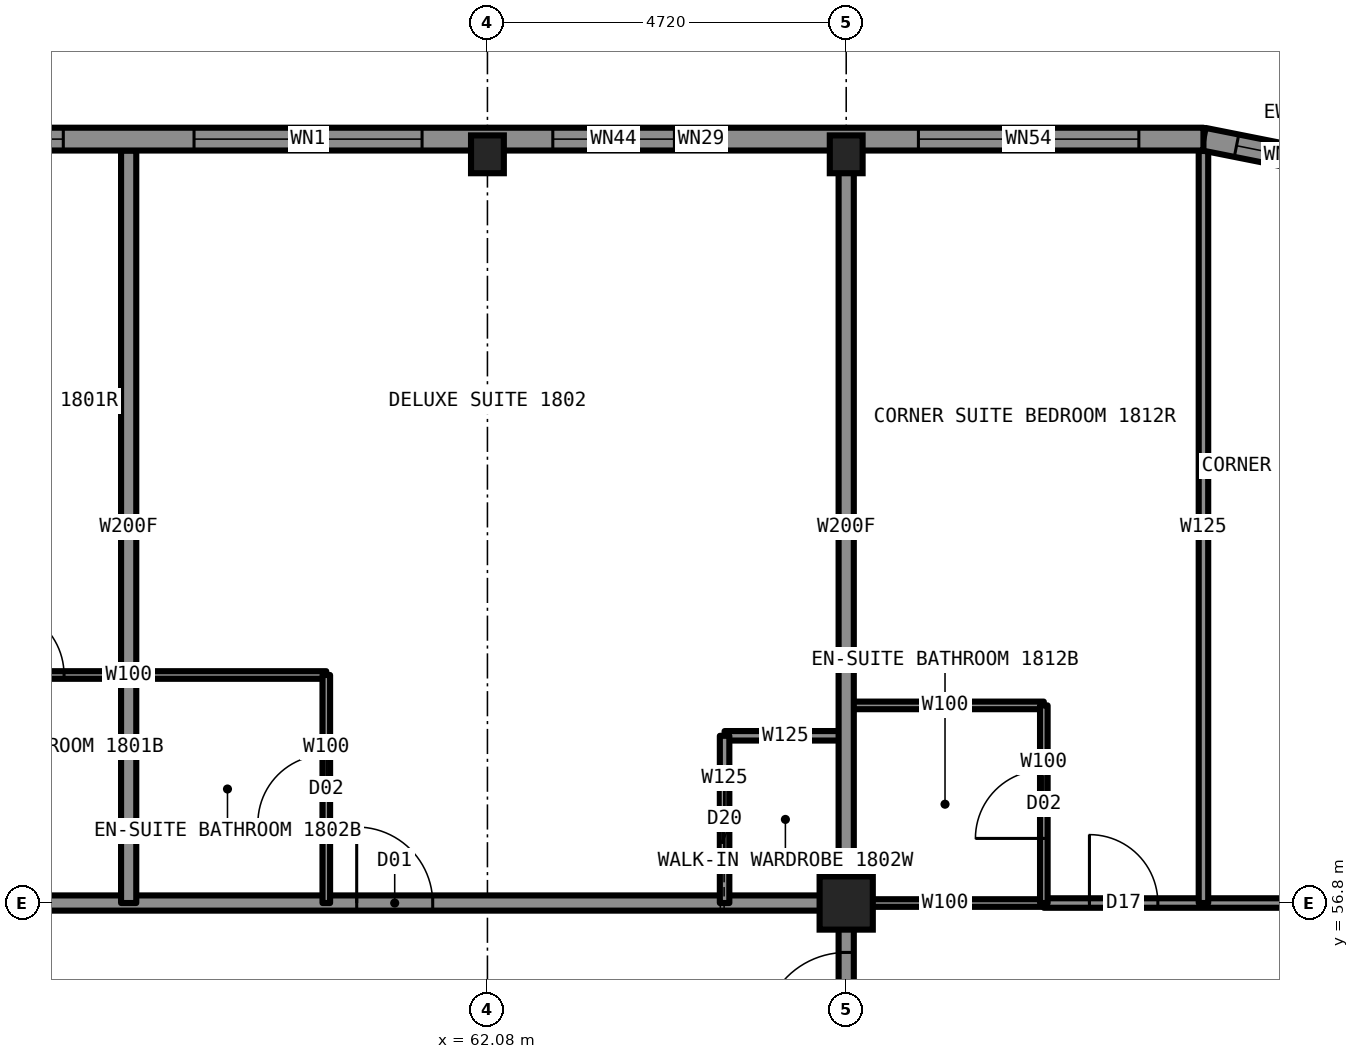
"""IFC4 building model, lengths in metres.
Left out: names, types, materials, properties, quantities, classifications, styles, units other than length and angle.
Written with IfcOpenShell. Run it as: python <this file> out.ifc"""

import sys

from ifc_helpers import new_model, si_unit, direction, frame, frame_2d, origin, origin_2d, place, context, subcontext, project, spatial, rectangle, hollow_rectangle, i_section, extrude, element, fill, save


model = new_model("IFC4")
c1 = context("Model", 3, precision=1e-05, world=origin(), true_north=direction((0.0, 1.0)))
c2 = subcontext(c1, "Body", "Model", "MODEL_VIEW")
j1 = project(units=[si_unit("LENGTHUNIT", "METRE"), si_unit("PLANEANGLEUNIT", "RADIAN")], contexts=[c1])
p1 = place(None, origin())
s1 = spatial("IfcSite", under=j1, at=p1, CompositionType="ELEMENT")
p2 = place(p1, origin())
s2 = spatial("IfcBuilding", under=s1, at=p2, CompositionType="ELEMENT")
p3 = place(p2, frame((0.0, 0.0, 70.5)))
s3 = spatial("IfcBuildingStorey", under=s2, at=p3, CompositionType="ELEMENT", Elevation=70.5)
for number, where, z_axis, x_axis in (
    (1, (62.08, 66.65, 0.0), (0.0, 0.0, 1.0), (1.0, 0.0, 0.0)),
    (2, (66.8, 66.65, 0.0), (0.0, 0.0, 1.0), (1.0, 0.0, 0.0)),
):
    element("IfcColumn", number, at=place(p3, frame(where, z_axis=z_axis, x_axis=x_axis)), inside=s3, PredefinedType="COLUMN", context=c2, shape_type="SweptSolid", body=[
        extrude(i_section(OverallWidth=0.432, OverallDepth=0.498, WebThickness=0.056, FlangeThickness=0.089, at=origin_2d()), origin(), (0.0, 0.0, 1.0), 3.5),
    ])
p4 = place(p3, frame((66.8, 56.8, 0.0), z_axis=(0.0, 0.0, 1.0), x_axis=(1.0, 0.0, 0.0)))
e3 = element("IfcColumn", 3, at=p4, inside=s3, PredefinedType="COLUMN", context=c2, shape_type="SweptSolid", body=[
    extrude(hollow_rectangle(XDim=0.7, YDim=0.7, WallThickness=0.06, at=origin_2d()), origin(), (0.0, 0.0, 1.0), 3.5),
])
p5 = place(p3, frame((66.8, 56.8, 0.0), z_axis=(0.0, 0.0, 1.0), x_axis=(1.0, 0.0, 0.0)))
e4 = element("IfcWall", 4, at=p5, inside=s3, PredefinedType="PARTITIONING", context=c2, shape_type="SweptSolid", body=[
    extrude(rectangle(XDim=2.6, YDim=0.1, at=frame_2d((1.3, 0.0))), origin(), (0.0, 0.0, 1.0), 2.573),
])
p6 = place(p3, frame((43.2, 56.8, 0.0), z_axis=(0.0, 0.0, 1.0), x_axis=(1.0, 0.0, 0.0)))
e5 = element("IfcWall", 5, at=p6, inside=s3, PredefinedType="PARTITIONING", context=c2, shape_type="SweptSolid", body=[
    extrude(rectangle(XDim=23.6, YDim=0.2, at=frame_2d((11.8, 0.0))), origin(), (0.0, 0.0, 1.0), 3.33),
])
p7 = place(p6, frame((1.85, 0.0, 0.0)))
e6 = element("IfcOpeningElement", 6, at=p7, cuts=e5, PredefinedType="OPENING", context=c2, shape_type="SweptSolid", body=[
    extrude(rectangle(XDim=1.1, YDim=2.2, at=frame_2d((0.55, 1.1))), frame((0.0, 0.11, 0.0), z_axis=(0.0, -1.0, 0.0), x_axis=(1.0, 0.0, 0.0)), (0.0, 0.0, 1.0), 0.22),
])
p8 = place(p6, frame((17.16, 0.0, 0.0)))
e7 = element("IfcOpeningElement", 7, at=p8, cuts=e5, PredefinedType="OPENING", context=c2, shape_type="SweptSolid", body=[
    extrude(rectangle(XDim=1.0, YDim=2.2, at=frame_2d((0.5, 1.1))), frame((0.0, 0.11, 0.0), z_axis=(0.0, -1.0, 0.0), x_axis=(1.0, 0.0, 0.0)), (0.0, 0.0, 1.0), 0.22),
])
p9 = place(p3, frame((69.4, 56.8, 0.0), z_axis=(0.0, 0.0, 1.0), x_axis=(1.0, 0.0, 0.0)))
e8 = element("IfcWall", 8, at=p9, inside=s3, PredefinedType="PARTITIONING", context=c2, shape_type="SweptSolid", body=[
    extrude(rectangle(XDim=7.3, YDim=0.125, at=frame_2d((3.65, 0.0))), origin(), (0.0, 0.0, 1.0), 2.573),
])
p10 = place(p9, frame((0.6, 0.0, 0.0)))
e9 = element("IfcOpeningElement", 9, at=p10, cuts=e8, PredefinedType="OPENING", context=c2, shape_type="SweptSolid", body=[
    extrude(rectangle(XDim=0.9, YDim=2.2, at=frame_2d((0.45, 1.1))), frame((0.0, 0.073, 0.0), z_axis=(0.0, -1.0, 0.0), x_axis=(1.0, 0.0, 0.0)), (0.0, 0.0, 1.0), 0.145),
])
p11 = place(p9, frame((4.4, 0.0, 0.0)))
e10 = element("IfcOpeningElement", 10, at=p11, cuts=e8, PredefinedType="OPENING", context=c2, shape_type="SweptSolid", body=[
    extrude(rectangle(XDim=0.9, YDim=2.2, at=frame_2d((0.45, 1.1))), frame((0.0, 0.073, 0.0), z_axis=(0.0, -1.0, 0.0), x_axis=(1.0, 0.0, 0.0)), (0.0, 0.0, 1.0), 0.145),
])
p12 = place(p3, frame((65.2, 59.0, 0.0), z_axis=(0.0, 0.0, 1.0), x_axis=(1.0, 0.0, 0.0)))
e11 = element("IfcWall", 11, at=p12, inside=s3, PredefinedType="PARTITIONING", context=c2, shape_type="SweptSolid", body=[
    extrude(rectangle(XDim=1.6, YDim=0.125, at=frame_2d((0.8, 0.0))), origin(), (0.0, 0.0, 1.0), 3.33),
])
p13 = place(p3, frame((66.8, 59.4, 0.0), z_axis=(0.0, 0.0, 1.0), x_axis=(1.0, 0.0, 0.0)))
e12 = element("IfcWall", 12, at=p13, inside=s3, PredefinedType="PARTITIONING", context=c2, shape_type="SweptSolid", body=[
    extrude(rectangle(XDim=2.6, YDim=0.1, at=frame_2d((1.3, 0.0))), origin(), (0.0, 0.0, 1.0), 3.33),
])
p14 = place(p3, frame((54.76, 59.8, 0.0), z_axis=(0.0, 0.0, 1.0), x_axis=(1.0, 0.0, 0.0)))
e13 = element("IfcWall", 13, at=p14, inside=s3, PredefinedType="PARTITIONING", context=c2, shape_type="SweptSolid", body=[
    extrude(rectangle(XDim=5.2, YDim=0.1, at=frame_2d((2.6, 0.0))), origin(), (0.0, 0.0, 1.0), 3.33),
])
p15 = place(p14, frame((0.85, 0.0, 0.0)))
e14 = element("IfcOpeningElement", 14, at=p15, cuts=e13, PredefinedType="OPENING", context=c2, shape_type="SweptSolid", body=[
    extrude(rectangle(XDim=0.9, YDim=2.1, at=frame_2d((0.45, 1.05))), frame((0.0, 0.06, 0.0), z_axis=(0.0, -1.0, 0.0), x_axis=(1.0, 0.0, 0.0)), (0.0, 0.0, 1.0), 0.12),
])
p16 = place(p3, frame((65.2, 56.8, 0.0), z_axis=(0.0, 0.0, 1.0), x_axis=(0.0, 1.0, 0.0)))
e15 = element("IfcWall", 15, at=p16, inside=s3, PredefinedType="PARTITIONING", context=c2, shape_type="SweptSolid", body=[
    extrude(rectangle(XDim=2.2, YDim=0.125, at=frame_2d((1.1, 0.0))), origin(), (0.0, 0.0, 1.0), 3.33),
])
p17 = place(p16, frame((0.7, 0.0, 0.0)))
e16 = element("IfcOpeningElement", 16, at=p17, cuts=e15, PredefinedType="OPENING", context=c2, shape_type="SweptSolid", body=[
    extrude(rectangle(XDim=0.8, YDim=2.1, at=frame_2d((0.4, 1.05))), frame((0.0, 0.073, 0.0), z_axis=(0.0, -1.0, 0.0), x_axis=(1.0, 0.0, 0.0)), (0.0, 0.0, 1.0), 0.145),
])
p18 = place(p3, frame((66.8, 33.2, 0.0), z_axis=(0.0, 0.0, 1.0), x_axis=(0.0, 1.0, 0.0)))
e17 = element("IfcWall", 17, at=p18, inside=s3, PredefinedType="PARTITIONING", context=c2, shape_type="SweptSolid", body=[
    extrude(rectangle(XDim=23.6, YDim=0.2, at=frame_2d((11.8, 0.0))), origin(), (0.0, 0.0, 1.0), 3.33),
])
p19 = place(p18, frame((6.98, 0.0, 0.0)))
e18 = element("IfcOpeningElement", 18, at=p19, cuts=e17, PredefinedType="OPENING", context=c2, shape_type="SweptSolid", body=[
    extrude(rectangle(XDim=1.0, YDim=2.2, at=frame_2d((0.5, 1.1))), frame((0.0, 0.11, 0.0), z_axis=(0.0, -1.0, 0.0), x_axis=(1.0, 0.0, 0.0)), (0.0, 0.0, 1.0), 0.22),
])
p20 = place(p18, frame((12.44, 0.0, 0.0)))
e19 = element("IfcOpeningElement", 19, at=p20, cuts=e17, PredefinedType="OPENING", context=c2, shape_type="SweptSolid", body=[
    extrude(rectangle(XDim=1.0, YDim=2.2, at=frame_2d((0.5, 1.1))), frame((0.0, 0.11, 0.0), z_axis=(0.0, -1.0, 0.0), x_axis=(1.0, 0.0, 0.0)), (0.0, 0.0, 1.0), 0.22),
])
p21 = place(p18, frame((21.85, 0.0, 0.0)))
e20 = element("IfcOpeningElement", 20, at=p21, cuts=e17, PredefinedType="OPENING", context=c2, shape_type="SweptSolid", body=[
    extrude(rectangle(XDim=1.1, YDim=2.2, at=frame_2d((0.55, 1.1))), frame((0.0, 0.11, 0.0), z_axis=(0.0, -1.0, 0.0), x_axis=(1.0, 0.0, 0.0)), (0.0, 0.0, 1.0), 0.22),
])
p22 = place(p18, frame((0.66, 0.0, 0.0)))
e21 = element("IfcOpeningElement", 21, at=p22, cuts=e17, PredefinedType="OPENING", context=c2, shape_type="SweptSolid", body=[
    extrude(rectangle(XDim=1.1, YDim=2.2, at=frame_2d((0.55, 1.1))), frame((0.0, 0.11, 0.0), z_axis=(0.0, -1.0, 0.0), x_axis=(1.0, 0.0, 0.0)), (0.0, 0.0, 1.0), 0.22),
])
p23 = place(p3, frame((66.8, 56.8, 0.0), z_axis=(0.0, 0.0, 1.0), x_axis=(0.0, 1.0, 0.0)))
e22 = element("IfcWall", 22, at=p23, inside=s3, PredefinedType="PARTITIONING", context=c2, shape_type="SweptSolid", body=[
    extrude(rectangle(XDim=9.9, YDim=0.2, at=frame_2d((4.95, 0.0))), origin(), (0.0, 0.0, 1.0), 2.573),
])
p24 = place(p3, frame((69.4, 56.8, 0.0), z_axis=(0.0, 0.0, 1.0), x_axis=(0.0, 1.0, 0.0)))
e23 = element("IfcWall", 23, at=p24, inside=s3, PredefinedType="PARTITIONING", context=c2, shape_type="SweptSolid", body=[
    extrude(rectangle(XDim=2.6, YDim=0.1, at=frame_2d((1.3, 0.0))), origin(), (0.0, 0.0, 1.0), 3.33),
])
p25 = place(p24, frame((0.85, 0.0, 0.0)))
e24 = element("IfcOpeningElement", 24, at=p25, cuts=e23, PredefinedType="OPENING", context=c2, shape_type="SweptSolid", body=[
    extrude(rectangle(XDim=0.9, YDim=2.1, at=frame_2d((0.45, 1.05))), frame((0.0, 0.06, 0.0), z_axis=(0.0, -1.0, 0.0), x_axis=(1.0, 0.0, 0.0)), (0.0, 0.0, 1.0), 0.12),
])
p26 = place(p3, frame((71.5, 56.8, 0.0), z_axis=(0.0, 0.0, 1.0), x_axis=(0.0, 1.0, 0.0)))
e25 = element("IfcWall", 25, at=p26, inside=s3, PredefinedType="PARTITIONING", context=c2, shape_type="SweptSolid", body=[
    extrude(rectangle(XDim=9.894, YDim=0.125, at=frame_2d((4.947, 0.0))), origin(), (0.0, 0.0, 1.0), 3.33),
])
p27 = place(p3, frame((57.36, 56.8, 0.0), z_axis=(0.0, 0.0, 1.0), x_axis=(0.0, 1.0, 0.0)))
e26 = element("IfcWall", 26, at=p27, inside=s3, PredefinedType="PARTITIONING", context=c2, shape_type="SweptSolid", body=[
    extrude(rectangle(XDim=9.9, YDim=0.2, at=frame_2d((4.95, 0.0))), origin(), (0.0, 0.0, 1.0), 3.33),
])
p28 = place(p3, frame((59.96, 56.8, 0.0), z_axis=(0.0, 0.0, 1.0), x_axis=(0.0, 1.0, 0.0)))
e27 = element("IfcWall", 27, at=p28, inside=s3, PredefinedType="PARTITIONING", context=c2, shape_type="SweptSolid", body=[
    extrude(rectangle(XDim=3.0, YDim=0.1, at=frame_2d((1.5, 0.0))), origin(), (0.0, 0.0, 1.0), 3.33),
])
p29 = place(p28, frame((1.05, 0.0, 0.0)))
e28 = element("IfcOpeningElement", 28, at=p29, cuts=e27, PredefinedType="OPENING", context=c2, shape_type="SweptSolid", body=[
    extrude(rectangle(XDim=0.9, YDim=2.1, at=frame_2d((0.45, 1.05))), frame((0.0, 0.06, 0.0), z_axis=(0.0, -1.0, 0.0), x_axis=(1.0, 0.0, 0.0)), (0.0, 0.0, 1.0), 0.12),
])
p30 = place(p3, frame((73.547, 66.443, 0.0), z_axis=(0.0, 0.0, 1.0), x_axis=(-0.980787050784, 0.195081421501, 0.0)))
e29 = element("IfcWall", 29, at=p30, inside=s3, PredefinedType="SOLIDWALL", context=c2, shape_type="SweptSolid", body=[
    extrude(rectangle(XDim=2.087, YDim=0.3, at=frame_2d((1.044, 0.0))), origin(), (0.0, 0.0, 1.0), 3.33),
])
p31 = place(p30, frame((0.444, 0.0, 0.5)))
e30 = element("IfcOpeningElement", 30, at=p31, cuts=e29, PredefinedType="OPENING", context=c2, shape_type="SweptSolid", body=[
    extrude(rectangle(XDim=1.2, YDim=2.0, at=frame_2d((0.6, 1.0))), frame((0.0, 0.16, 0.0), z_axis=(0.0, -1.0, 0.0), x_axis=(1.0, 0.0, 0.0)), (0.0, 0.0, 1.0), 0.32),
])
p32 = place(p3, frame((71.5, 66.85, 0.0), z_axis=(0.0, 0.0, 1.0), x_axis=(-1.0, 0.0, 0.0)))
e31 = element("IfcWall", 31, at=p32, inside=s3, PredefinedType="SOLIDWALL", context=c2, shape_type="SweptSolid", body=[
    extrude(rectangle(XDim=33.0, YDim=0.3, at=frame_2d((16.5, 0.0))), origin(), (0.0, 0.0, 1.0), 2.83),
])
p33 = place(p32, frame((0.85, 0.0, 0.5)))
e32 = element("IfcOpeningElement", 32, at=p33, cuts=e31, PredefinedType="OPENING", context=c2, shape_type="SweptSolid", body=[
    extrude(rectangle(XDim=2.9, YDim=2.0, at=frame_2d((1.45, 1.0))), frame((0.0, 0.16, 0.0), z_axis=(0.0, -1.0, 0.0), x_axis=(1.0, 0.0, 0.0)), (0.0, 0.0, 1.0), 0.32),
])
p34 = place(p32, frame((6.96, 0.0, 0.55)))
e33 = element("IfcOpeningElement", 33, at=p34, cuts=e31, PredefinedType="OPENING", context=c2, shape_type="SweptSolid", body=[
    extrude(rectangle(XDim=1.6, YDim=1.9, at=frame_2d((0.8, 0.95))), frame((0.0, 0.16, 0.0), z_axis=(0.0, -1.0, 0.0), x_axis=(1.0, 0.0, 0.0)), (0.0, 0.0, 1.0), 0.32),
])
p35 = place(p32, frame((10.28, 0.0, 0.5)))
e34 = element("IfcOpeningElement", 34, at=p35, cuts=e31, PredefinedType="OPENING", context=c2, shape_type="SweptSolid", body=[
    extrude(rectangle(XDim=3.0, YDim=2.0, at=frame_2d((1.5, 1.0))), frame((0.0, 0.16, 0.0), z_axis=(0.0, -1.0, 0.0), x_axis=(1.0, 0.0, 0.0)), (0.0, 0.0, 1.0), 0.32),
])
p36 = place(p32, frame((15.0, 0.0, 0.5)))
e35 = element("IfcOpeningElement", 35, at=p36, cuts=e31, PredefinedType="OPENING", context=c2, shape_type="SweptSolid", body=[
    extrude(rectangle(XDim=3.0, YDim=2.0, at=frame_2d((1.5, 1.0))), frame((0.0, 0.16, 0.0), z_axis=(0.0, -1.0, 0.0), x_axis=(1.0, 0.0, 0.0)), (0.0, 0.0, 1.0), 0.32),
])
p37 = place(p32, frame((19.72, 0.0, 0.5)))
e36 = element("IfcOpeningElement", 36, at=p37, cuts=e31, PredefinedType="OPENING", context=c2, shape_type="SweptSolid", body=[
    extrude(rectangle(XDim=3.0, YDim=2.0, at=frame_2d((1.5, 1.0))), frame((0.0, 0.16, 0.0), z_axis=(0.0, -1.0, 0.0), x_axis=(1.0, 0.0, 0.0)), (0.0, 0.0, 1.0), 0.32),
])
p38 = place(p32, frame((24.44, 0.0, 0.55)))
e37 = element("IfcOpeningElement", 37, at=p38, cuts=e31, PredefinedType="OPENING", context=c2, shape_type="SweptSolid", body=[
    extrude(rectangle(XDim=1.6, YDim=1.9, at=frame_2d((0.8, 0.95))), frame((0.0, 0.16, 0.0), z_axis=(0.0, -1.0, 0.0), x_axis=(1.0, 0.0, 0.0)), (0.0, 0.0, 1.0), 0.32),
])
p39 = place(p32, frame((29.25, 0.0, 0.5)))
e38 = element("IfcOpeningElement", 38, at=p39, cuts=e31, PredefinedType="OPENING", context=c2, shape_type="SweptSolid", body=[
    extrude(rectangle(XDim=2.9, YDim=2.0, at=frame_2d((1.45, 1.0))), frame((0.0, 0.16, 0.0), z_axis=(0.0, -1.0, 0.0), x_axis=(1.0, 0.0, 0.0)), (0.0, 0.0, 1.0), 0.32),
])
p40 = place(p32, frame((6.31, 0.0, 1.45)))
e39 = element("IfcOpeningElement", 39, at=p40, cuts=e31, PredefinedType="OPENING", context=c2, shape_type="SweptSolid", body=[
    extrude(rectangle(XDim=0.6, YDim=1.0, at=frame_2d((0.3, 0.5))), frame((0.0, 0.16, 0.0), z_axis=(0.0, -1.0, 0.0), x_axis=(1.0, 0.0, 0.0)), (0.0, 0.0, 1.0), 0.32),
])
p41 = place(p32, frame((26.04, 0.0, 1.45)))
e40 = element("IfcOpeningElement", 40, at=p41, cuts=e31, PredefinedType="OPENING", context=c2, shape_type="SweptSolid", body=[
    extrude(rectangle(XDim=0.6, YDim=1.0, at=frame_2d((0.3, 0.5))), frame((0.0, 0.16, 0.0), z_axis=(0.0, -1.0, 0.0), x_axis=(1.0, 0.0, 0.0)), (0.0, 0.0, 1.0), 0.32),
])
p42 = place(p15, origin())
e41 = element("IfcDoor", 41, at=p42, inside=s3, OperationType="SINGLE_SWING_RIGHT", PredefinedType="DOOR", context=c2, shape_type="SweptSolid", body=[
    extrude(rectangle(XDim=0.9, YDim=2.1, at=frame_2d((0.45, 1.05))), frame((0.0, 0.025, 0.0), z_axis=(0.0, -1.0, 0.0), x_axis=(1.0, 0.0, 0.0)), (0.0, 0.0, 1.0), 0.05),
])
fill(e14, e41)
p43 = place(p8, origin())
e42 = element("IfcDoor", 42, at=p43, inside=s3, OperationType="SINGLE_SWING_LEFT", PredefinedType="DOOR", context=c2, shape_type="SweptSolid", body=[
    extrude(rectangle(XDim=1.0, YDim=2.2, at=frame_2d((0.5, 1.1))), frame((0.0, 0.025, 0.0), z_axis=(0.0, -1.0, 0.0), x_axis=(1.0, 0.0, 0.0)), (0.0, 0.0, 1.0), 0.05),
])
fill(e7, e42)
p44 = place(p29, origin())
e43 = element("IfcDoor", 43, at=p44, inside=s3, OperationType="SINGLE_SWING_RIGHT", PredefinedType="DOOR", context=c2, shape_type="SweptSolid", body=[
    extrude(rectangle(XDim=0.9, YDim=2.1, at=frame_2d((0.45, 1.05))), frame((0.0, 0.025, 0.0), z_axis=(0.0, -1.0, 0.0), x_axis=(1.0, 0.0, 0.0)), (0.0, 0.0, 1.0), 0.05),
])
fill(e28, e43)
p45 = place(p17, origin())
e44 = element("IfcDoor", 44, at=p45, inside=s3, OperationType="SLIDING_TO_LEFT", PredefinedType="DOOR", context=c2, shape_type="SweptSolid", body=[
    extrude(rectangle(XDim=0.8, YDim=2.1, at=frame_2d((0.4, 1.05))), frame((0.0, 0.025, 0.0), z_axis=(0.0, -1.0, 0.0), x_axis=(1.0, 0.0, 0.0)), (0.0, 0.0, 1.0), 0.05),
])
fill(e16, e44)
p46 = place(p21, origin())
e45 = element("IfcDoor", 45, at=p46, inside=s3, OperationType="SINGLE_SWING_LEFT", PredefinedType="DOOR", context=c2, shape_type="SweptSolid", body=[
    extrude(rectangle(XDim=1.1, YDim=2.2, at=frame_2d((0.55, 1.1))), frame((0.0, 0.025, 0.0), z_axis=(0.0, -1.0, 0.0), x_axis=(1.0, 0.0, 0.0)), (0.0, 0.0, 1.0), 0.05),
])
fill(e20, e45)
p47 = place(p25, origin())
e46 = element("IfcDoor", 46, at=p47, inside=s3, OperationType="SINGLE_SWING_RIGHT", PredefinedType="DOOR", context=c2, shape_type="SweptSolid", body=[
    extrude(rectangle(XDim=0.9, YDim=2.1, at=frame_2d((0.45, 1.05))), frame((0.0, 0.025, 0.0), z_axis=(0.0, -1.0, 0.0), x_axis=(1.0, 0.0, 0.0)), (0.0, 0.0, 1.0), 0.05),
])
fill(e24, e46)
p48 = place(p10, origin())
e47 = element("IfcDoor", 47, at=p48, inside=s3, OperationType="SINGLE_SWING_LEFT", PredefinedType="DOOR", context=c2, shape_type="SweptSolid", body=[
    extrude(rectangle(XDim=0.9, YDim=2.2, at=frame_2d((0.45, 1.1))), frame((0.0, 0.025, 0.0), z_axis=(0.0, -1.0, 0.0), x_axis=(1.0, 0.0, 0.0)), (0.0, 0.0, 1.0), 0.05),
])
fill(e9, e47)
p49 = place(p31, origin())
e48 = element("IfcWindow", 48, at=p49, inside=s3, PartitioningType="SINGLE_PANEL", PredefinedType="WINDOW", context=c2, shape_type="SweptSolid", body=[
    extrude(rectangle(XDim=1.2, YDim=2.0, at=frame_2d((0.6, 1.0))), frame((0.0, 0.03, 0.0), z_axis=(0.0, -1.0, 0.0), x_axis=(1.0, 0.0, 0.0)), (0.0, 0.0, 1.0), 0.06),
])
fill(e30, e48)
p50 = place(p33, origin())
e49 = element("IfcWindow", 49, at=p50, inside=s3, PartitioningType="SINGLE_PANEL", PredefinedType="WINDOW", context=c2, shape_type="SweptSolid", body=[
    extrude(rectangle(XDim=2.9, YDim=2.0, at=frame_2d((1.45, 1.0))), frame((0.0, 0.03, 0.0), z_axis=(0.0, -1.0, 0.0), x_axis=(1.0, 0.0, 0.0)), (0.0, 0.0, 1.0), 0.06),
])
fill(e32, e49)
p51 = place(p34, origin())
e50 = element("IfcWindow", 50, at=p51, inside=s3, PartitioningType="SINGLE_PANEL", PredefinedType="WINDOW", context=c2, shape_type="SweptSolid", body=[
    extrude(rectangle(XDim=1.6, YDim=1.9, at=frame_2d((0.8, 0.95))), frame((0.0, 0.03, 0.0), z_axis=(0.0, -1.0, 0.0), x_axis=(1.0, 0.0, 0.0)), (0.0, 0.0, 1.0), 0.06),
])
fill(e33, e50)
p52 = place(p35, origin())
e51 = element("IfcWindow", 51, at=p52, inside=s3, PartitioningType="SINGLE_PANEL", PredefinedType="WINDOW", context=c2, shape_type="SweptSolid", body=[
    extrude(rectangle(XDim=3.0, YDim=2.0, at=frame_2d((1.5, 1.0))), frame((0.0, 0.03, 0.0), z_axis=(0.0, -1.0, 0.0), x_axis=(1.0, 0.0, 0.0)), (0.0, 0.0, 1.0), 0.06),
])
fill(e34, e51)
p53 = place(p36, origin())
e52 = element("IfcWindow", 52, at=p53, inside=s3, PartitioningType="SINGLE_PANEL", PredefinedType="WINDOW", context=c2, shape_type="SweptSolid", body=[
    extrude(rectangle(XDim=3.0, YDim=2.0, at=frame_2d((1.5, 1.0))), frame((0.0, 0.03, 0.0), z_axis=(0.0, -1.0, 0.0), x_axis=(1.0, 0.0, 0.0)), (0.0, 0.0, 1.0), 0.06),
])
fill(e35, e52)
p54 = place(p40, origin())
e53 = element("IfcWindow", 53, at=p54, inside=s3, PartitioningType="SINGLE_PANEL", PredefinedType="WINDOW", context=c2, shape_type="SweptSolid", body=[
    extrude(rectangle(XDim=0.6, YDim=1.0, at=frame_2d((0.3, 0.5))), frame((0.0, 0.03, 0.0), z_axis=(0.0, -1.0, 0.0), x_axis=(1.0, 0.0, 0.0)), (0.0, 0.0, 1.0), 0.06),
])
fill(e39, e53)
save(model, sys.argv[1])
